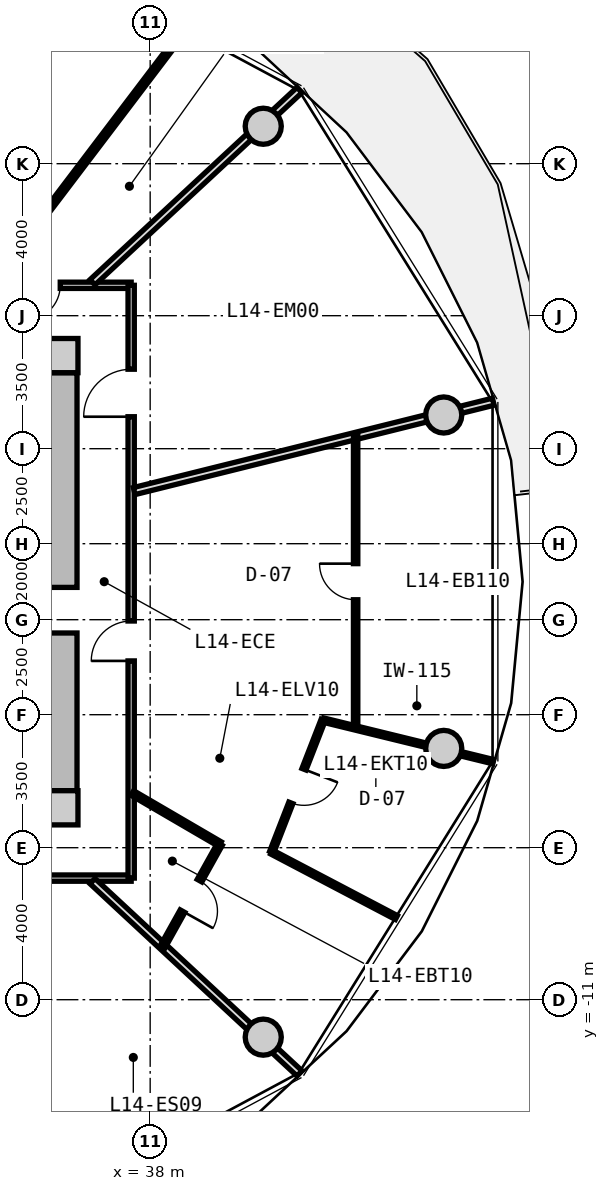
"""IFC4 building model, lengths in metres.
Left out: names, types, materials, properties, quantities, classifications, styles, units other than length and angle.
Written with IfcOpenShell. Run it as: python <this file> out.ifc"""

import sys

from ifc_helpers import new_model, si_unit, direction, frame, frame_2d, origin, origin_2d, place, context, subcontext, project, spatial, rectangle, circle, extrude, source, transform, mapped, element, fill, save


model = new_model("IFC4")
c1 = context("Model", 3, precision=1e-05, world=origin(), true_north=direction((0.0, 1.0)))
c2 = subcontext(c1, "Body", "Model", "MODEL_VIEW")
j1 = project(units=[si_unit("LENGTHUNIT", "METRE"), si_unit("PLANEANGLEUNIT", "RADIAN")], contexts=[c1])
p1 = place(None, origin())
s1 = spatial("IfcSite", under=j1, at=p1, CompositionType="ELEMENT")
p2 = place(p1, origin())
s2 = spatial("IfcBuilding", under=s1, at=p2, CompositionType="ELEMENT")
p3 = place(p2, frame((0.0, 0.0, 49.05)))
s3 = spatial("IfcBuildingStorey", under=s2, at=p3, CompositionType="ELEMENT", Elevation=49.05)
m1 = source(origin(), c2, "Body", "SweptSolid", [
    extrude(rectangle(XDim=0.9, YDim=0.9, at=origin_2d()), origin(), (0.0, 0.0, 1.0), 3.05),
])
for number, where, z_axis, x_axis in (
    (1, (35.65, -5.95, 0.0), (0.0, 0.0, 1.0), (1.0, 0.0, 0.0)),
    (2, (35.65, 5.95, 0.0), (0.0, 0.0, 1.0), (1.0, 0.0, 0.0)),
):
    element("IfcColumn", number, at=place(p3, frame(where, z_axis=z_axis, x_axis=x_axis)), inside=s3, PredefinedType="COLUMN", context=c2, shape_type="MappedRepresentation", body=[
        mapped(m1, transform((0.0, 0.0, 0.0), x_axis=(1.0, 0.0, 0.0), y_axis=(0.0, 1.0, 0.0), z_axis=(0.0, 0.0, 1.0), scale=1.0)),
    ])
m2 = source(origin(), c2, "Body", "SweptSolid", [
    extrude(rectangle(XDim=11.0, YDim=0.85, at=frame_2d((5.5, 0.0))), origin(), (0.0, 0.0, 1.0), 2.79),
])
p4 = place(p3, frame((35.65, 5.5, 0.0), z_axis=(0.0, 0.0, 1.0), x_axis=(0.0, -1.0, 0.0)))
e3 = element("IfcWall", 3, at=p4, inside=s3, PredefinedType="SHEAR", context=c2, shape_type="MappedRepresentation", body=[
    mapped(m2, transform((0.0, 0.0, 0.0), x_axis=(1.0, 0.0, 0.0), y_axis=(0.0, 1.0, 0.0), z_axis=(0.0, 0.0, 1.0), scale=1.0)),
])
p5 = place(p4, frame((5.65, 0.0, 0.0)))
e4 = element("IfcOpeningElement", 4, at=p5, cuts=e3, PredefinedType="OPENING", context=c2, shape_type="SweptSolid", body=[
    extrude(rectangle(XDim=1.2, YDim=2.15, at=frame_2d((0.6, 1.075))), frame((0.0, 0.435, 0.0), z_axis=(0.0, -1.0, 0.0), x_axis=(1.0, 0.0, 0.0)), (0.0, 0.0, 1.0), 0.87),
])
m3 = source(origin(), c2, "Body", "SweptSolid", [
    extrude(circle(Radius=0.475, at=origin_2d()), origin(), (0.0, 0.0, 1.0), 3.05),
])
for number, where, z_axis, x_axis in (
    (5, (45.725, 4.387, 0.0), (0.0, 0.0, 1.0), (1.0, 0.0, 0.0)),
    (6, (40.975, 11.985, 0.0), (0.0, 0.0, 1.0), (1.0, 0.0, 0.0)),
    (7, (40.975, -11.985, 0.0), (0.0, 0.0, 1.0), (1.0, 0.0, 0.0)),
    (8, (45.725, -4.387, 0.0), (0.0, 0.0, 1.0), (1.0, 0.0, 0.0)),
):
    element("IfcColumn", number, at=place(p3, frame(where, z_axis=z_axis, x_axis=x_axis)), inside=s3, PredefinedType="COLUMN", context=c2, shape_type="MappedRepresentation", body=[
        mapped(m3, transform((0.0, 0.0, 0.0), x_axis=(1.0, 0.0, 0.0), y_axis=(0.0, 1.0, 0.0), z_axis=(0.0, 0.0, 1.0), scale=1.0)),
    ])
m4 = source(origin(), c2, "Body", "SweptSolid", [
    extrude(rectangle(XDim=19.0, YDim=0.165, at=frame_2d((9.5, 0.0))), origin(), (0.0, 0.0, 1.0), 2.775),
])
p6 = place(p3, frame((18.5, 7.8, 0.0), z_axis=(0.0, 0.0, 1.0), x_axis=(1.0, 0.0, 0.0)))
e9 = element("IfcWall", 9, at=p6, inside=s3, PredefinedType="PARTITIONING", context=c2, shape_type="MappedRepresentation", body=[
    mapped(m4, transform((0.0, 0.0, 0.0), x_axis=(1.0, 0.0, 0.0), y_axis=(0.0, 1.0, 0.0), z_axis=(0.0, 0.0, 1.0), scale=1.0)),
])
p7 = place(p6, frame((16.214, 0.0, 0.0)))
e10 = element("IfcOpeningElement", 10, at=p7, cuts=e9, PredefinedType="OPENING", context=c2, shape_type="SweptSolid", body=[
    extrude(rectangle(XDim=0.92, YDim=2.1, at=frame_2d((0.46, 1.05))), frame((0.0, 0.093, 0.0), z_axis=(0.0, -1.0, 0.0), x_axis=(1.0, 0.0, 0.0)), (0.0, 0.0, 1.0), 0.185),
])
p8 = place(p6, frame((13.063, 0.0, 0.0)))
e11 = element("IfcOpeningElement", 11, at=p8, cuts=e9, PredefinedType="OPENING", context=c2, shape_type="SweptSolid", body=[
    extrude(rectangle(XDim=0.92, YDim=2.1, at=frame_2d((0.46, 1.05))), frame((0.0, 0.093, 0.0), z_axis=(0.0, -1.0, 0.0), x_axis=(1.0, 0.0, 0.0)), (0.0, 0.0, 1.0), 0.185),
])
p9 = place(p6, frame((8.875, 0.0, 0.0)))
e12 = element("IfcOpeningElement", 12, at=p9, cuts=e9, PredefinedType="OPENING", context=c2, shape_type="SweptSolid", body=[
    extrude(rectangle(XDim=1.25, YDim=2.2, at=frame_2d((0.625, 1.1))), frame((0.0, 0.093, 0.0), z_axis=(0.0, -1.0, 0.0), x_axis=(1.0, 0.0, 0.0)), (0.0, 0.0, 1.0), 0.185),
])
p10 = place(p6, frame((3.506, 0.0, 0.0)))
e13 = element("IfcOpeningElement", 13, at=p10, cuts=e9, PredefinedType="OPENING", context=c2, shape_type="SweptSolid", body=[
    extrude(rectangle(XDim=1.25, YDim=2.2, at=frame_2d((0.625, 1.1))), frame((0.0, 0.093, 0.0), z_axis=(0.0, -1.0, 0.0), x_axis=(1.0, 0.0, 0.0)), (0.0, 0.0, 1.0), 0.185),
])
p11 = place(p3, frame((37.5, -7.8, 0.0), z_axis=(0.0, 0.0, 1.0), x_axis=(-1.0, 0.0, 0.0)))
e14 = element("IfcWall", 14, at=p11, inside=s3, PredefinedType="PARTITIONING", context=c2, shape_type="MappedRepresentation", body=[
    mapped(m4, transform((0.0, 0.0, 0.0), x_axis=(1.0, 0.0, 0.0), y_axis=(0.0, 1.0, 0.0), z_axis=(0.0, 0.0, 1.0), scale=1.0)),
])
p12 = place(p11, frame((12.706, 0.0, 0.0)))
e15 = element("IfcOpeningElement", 15, at=p12, cuts=e14, PredefinedType="OPENING", context=c2, shape_type="SweptSolid", body=[
    extrude(rectangle(XDim=1.05, YDim=2.15, at=frame_2d((0.525, 1.075))), frame((0.0, 0.093, 0.0), z_axis=(0.0, -1.0, 0.0), x_axis=(1.0, 0.0, 0.0)), (0.0, 0.0, 1.0), 0.185),
])
p13 = place(p11, frame((7.959, 0.0, 0.0)))
e16 = element("IfcOpeningElement", 16, at=p13, cuts=e14, PredefinedType="OPENING", context=c2, shape_type="SweptSolid", body=[
    extrude(rectangle(XDim=1.05, YDim=2.15, at=frame_2d((0.525, 1.075))), frame((0.0, 0.093, 0.0), z_axis=(0.0, -1.0, 0.0), x_axis=(1.0, 0.0, 0.0)), (0.0, 0.0, 1.0), 0.185),
])
p14 = place(p11, frame((2.451, 0.0, 0.0)))
e17 = element("IfcOpeningElement", 17, at=p14, cuts=e14, PredefinedType="OPENING", context=c2, shape_type="SweptSolid", body=[
    extrude(rectangle(XDim=1.05, YDim=2.15, at=frame_2d((0.525, 1.075))), frame((0.0, 0.093, 0.0), z_axis=(0.0, -1.0, 0.0), x_axis=(1.0, 0.0, 0.0)), (0.0, 0.0, 1.0), 0.185),
])
m5 = source(origin(), c2, "Body", "SweptSolid", [
    extrude(rectangle(XDim=15.6, YDim=0.165, at=frame_2d((7.8, 0.0))), origin(), (0.0, 0.0, 1.0), 2.775),
])
p15 = place(p3, frame((37.5, 7.8, 0.0), z_axis=(0.0, 0.0, 1.0), x_axis=(0.0, -1.0, 0.0)))
e18 = element("IfcWall", 18, at=p15, inside=s3, PredefinedType="PARTITIONING", context=c2, shape_type="MappedRepresentation", body=[
    mapped(m5, transform((0.0, 0.0, 0.0), x_axis=(1.0, 0.0, 0.0), y_axis=(0.0, 1.0, 0.0), z_axis=(0.0, 0.0, 1.0), scale=1.0)),
])
p16 = place(p15, frame((8.835, 0.0, 0.0)))
e19 = element("IfcOpeningElement", 19, at=p16, cuts=e18, PredefinedType="OPENING", context=c2, shape_type="SweptSolid", body=[
    extrude(rectangle(XDim=1.05, YDim=2.15, at=frame_2d((0.525, 1.075))), frame((0.0, 0.093, 0.0), z_axis=(0.0, -1.0, 0.0), x_axis=(1.0, 0.0, 0.0)), (0.0, 0.0, 1.0), 0.185),
])
p17 = place(p15, frame((2.208, 0.0, 0.0)))
e20 = element("IfcOpeningElement", 20, at=p17, cuts=e18, PredefinedType="OPENING", context=c2, shape_type="SweptSolid", body=[
    extrude(rectangle(XDim=1.25, YDim=2.2, at=frame_2d((0.625, 1.1))), frame((0.0, 0.093, 0.0), z_axis=(0.0, -1.0, 0.0), x_axis=(1.0, 0.0, 0.0)), (0.0, 0.0, 1.0), 0.185),
])
m6 = source(origin(), c2, "Body", "SweptSolid", [
    extrude(rectangle(XDim=7.435, YDim=0.19, at=frame_2d((3.717, 0.0))), origin(), (0.0, 0.0, 1.0), 2.225),
])
p18 = place(p3, frame((36.483, -7.88, 0.0), z_axis=(0.0, 0.0, 1.0), x_axis=(0.732651956848, -0.680603489652, 0.0)))
e21 = element("IfcWall", 21, at=p18, inside=s3, PredefinedType="PARTITIONING", context=c2, shape_type="MappedRepresentation", body=[
    mapped(m6, transform((0.0, 0.0, 0.0), x_axis=(1.0, 0.0, 0.0), y_axis=(0.0, 1.0, 0.0), z_axis=(0.0, 0.0, 1.0), scale=1.0)),
])
m7 = source(origin(), c2, "Body", "SweptSolid", [
    extrude(rectangle(XDim=9.737, YDim=0.19, at=frame_2d((4.869, 0.0))), origin(), (0.0, 0.0, 1.0), 2.225),
])
p19 = place(p3, frame((37.58, 2.385, 0.0), z_axis=(0.0, 0.0, 1.0), x_axis=(0.970392716238, 0.241532557375, 0.0)))
e22 = element("IfcWall", 22, at=p19, inside=s3, PredefinedType="PARTITIONING", context=c2, shape_type="MappedRepresentation", body=[
    mapped(m7, transform((0.0, 0.0, 0.0), x_axis=(1.0, 0.0, 0.0), y_axis=(0.0, 1.0, 0.0), z_axis=(0.0, 0.0, 1.0), scale=1.0)),
])
m8 = source(origin(), c2, "Body", "SweptSolid", [
    extrude(rectangle(XDim=7.709, YDim=0.115, at=frame_2d((3.855, 0.0))), origin(), (0.0, 0.0, 1.0), 2.775),
])
p20 = place(p3, frame((43.406, -3.855, 0.0), z_axis=(0.0, 0.0, 1.0), x_axis=(0.0, 1.0, 0.0)))
e23 = element("IfcWall", 23, at=p20, inside=s3, PredefinedType="PARTITIONING", context=c2, shape_type="MappedRepresentation", body=[
    mapped(m8, transform((0.0, 0.0, 0.0), x_axis=(1.0, 0.0, 0.0), y_axis=(0.0, 1.0, 0.0), z_axis=(0.0, 0.0, 1.0), scale=1.0)),
])
p21 = place(p20, frame((3.38, 0.0, 0.0)))
e24 = element("IfcOpeningElement", 24, at=p21, cuts=e23, PredefinedType="OPENING", context=c2, shape_type="SweptSolid", body=[
    extrude(rectangle(XDim=0.95, YDim=2.1, at=frame_2d((0.475, 1.05))), frame((0.0, 0.067, 0.0), z_axis=(0.0, -1.0, 0.0), x_axis=(1.0, 0.0, 0.0)), (0.0, 0.0, 1.0), 0.135),
])
m9 = source(origin(), c2, "Body", "SweptSolid", [
    extrude(rectangle(XDim=4.608, YDim=0.115, at=frame_2d((2.304, 0.0))), origin(), (0.0, 0.0, 1.0), 2.225),
])
p22 = place(p3, frame((42.553, -3.641, 0.0), z_axis=(0.0, 0.0, 1.0), x_axis=(0.97135200068, -0.237645304552, 0.0)))
e25 = element("IfcWall", 25, at=p22, inside=s3, PredefinedType="PARTITIONING", context=c2, shape_type="MappedRepresentation", body=[
    mapped(m9, transform((0.0, 0.0, 0.0), x_axis=(1.0, 0.0, 0.0), y_axis=(0.0, 1.0, 0.0), z_axis=(0.0, 0.0, 1.0), scale=1.0)),
])
m10 = source(origin(), c2, "Body", "SweptSolid", [
    extrude(rectangle(XDim=2.669, YDim=0.14, at=frame_2d((1.335, 0.0))), origin(), (0.0, 0.0, 1.0), 2.775),
])
p23 = place(p3, frame((37.53, -5.561, 0.0), z_axis=(0.0, 0.0, 1.0), x_axis=(0.86369928178, -0.50400749067, 0.0)))
e26 = element("IfcWall", 26, at=p23, inside=s3, PredefinedType="PARTITIONING", context=c2, shape_type="MappedRepresentation", body=[
    mapped(m10, transform((0.0, 0.0, 0.0), x_axis=(1.0, 0.0, 0.0), y_axis=(0.0, 1.0, 0.0), z_axis=(0.0, 0.0, 1.0), scale=1.0)),
])
m11 = source(origin(), c2, "Body", "SweptSolid", [
    extrude(rectangle(XDim=3.121, YDim=0.14, at=frame_2d((1.561, 0.0))), origin(), (0.0, 0.0, 1.0), 2.775),
])
p24 = place(p3, frame((39.836, -6.906, 0.0), z_axis=(0.0, 0.0, 1.0), x_axis=(-0.487302357327, -0.873233309342, 0.0)))
e27 = element("IfcWall", 27, at=p24, inside=s3, PredefinedType="PARTITIONING", context=c2, shape_type="MappedRepresentation", body=[
    mapped(m11, transform((0.0, 0.0, 0.0), x_axis=(1.0, 0.0, 0.0), y_axis=(0.0, 1.0, 0.0), z_axis=(0.0, 0.0, 1.0), scale=1.0)),
])
p25 = place(p24, frame((1.101, 0.0, 0.0)))
e28 = element("IfcOpeningElement", 28, at=p25, cuts=e27, PredefinedType="OPENING", context=c2, shape_type="SweptSolid", body=[
    extrude(rectangle(XDim=0.92, YDim=2.1, at=frame_2d((0.46, 1.05))), frame((0.0, 0.08, 0.0), z_axis=(0.0, -1.0, 0.0), x_axis=(1.0, 0.0, 0.0)), (0.0, 0.0, 1.0), 0.16),
])
m12 = source(origin(), c2, "Body", "SweptSolid", [
    extrude(rectangle(XDim=3.706, YDim=0.115, at=frame_2d((1.853, 0.0))), origin(), (0.0, 0.0, 1.0), 2.775),
])
p26 = place(p3, frame((41.198, -7.115, 0.0), z_axis=(0.0, 0.0, 1.0), x_axis=(0.88538502503, -0.464858427322, 0.0)))
e29 = element("IfcWall", 29, at=p26, inside=s3, PredefinedType="PARTITIONING", context=c2, shape_type="MappedRepresentation", body=[
    mapped(m12, transform((0.0, 0.0, 0.0), x_axis=(1.0, 0.0, 0.0), y_axis=(0.0, 1.0, 0.0), z_axis=(0.0, 0.0, 1.0), scale=1.0)),
])
m13 = source(origin(), c2, "Body", "SweptSolid", [
    extrude(rectangle(XDim=3.729, YDim=0.115, at=frame_2d((1.864, 0.0))), origin(), (0.0, 0.0, 1.0), 2.775),
])
p27 = place(p3, frame((41.198, -7.115, 0.0), z_axis=(0.0, 0.0, 1.0), x_axis=(0.363055991464, 0.93176732453, 0.0)))
e30 = element("IfcWall", 30, at=p27, inside=s3, PredefinedType="PARTITIONING", context=c2, shape_type="MappedRepresentation", body=[
    mapped(m13, transform((0.0, 0.0, 0.0), x_axis=(1.0, 0.0, 0.0), y_axis=(0.0, 1.0, 0.0), z_axis=(0.0, 0.0, 1.0), scale=1.0)),
])
p28 = place(p27, frame((1.389, 0.0, 0.0)))
e31 = element("IfcOpeningElement", 31, at=p28, cuts=e30, PredefinedType="OPENING", context=c2, shape_type="SweptSolid", body=[
    extrude(rectangle(XDim=0.95, YDim=2.1, at=frame_2d((0.475, 1.05))), frame((0.0, 0.067, 0.0), z_axis=(0.0, -1.0, 0.0), x_axis=(1.0, 0.0, 0.0)), (0.0, 0.0, 1.0), 0.135),
])
p29 = place(p3, frame((36.483, 7.88, 0.0), z_axis=(0.0, 0.0, 1.0), x_axis=(0.732651956848, 0.680603489652, 0.0)))
e32 = element("IfcWall", 32, at=p29, inside=s3, PredefinedType="PARTITIONING", context=c2, shape_type="MappedRepresentation", body=[
    mapped(m6, transform((0.0, 0.0, 0.0), x_axis=(1.0, 0.0, 0.0), y_axis=(0.0, 1.0, 0.0), z_axis=(0.0, 0.0, 1.0), scale=1.0)),
])
m14 = source(origin(), c2, "Body", "SweptSolid", [
    extrude(rectangle(XDim=8.436, YDim=0.14, at=frame_2d((4.218, 0.0))), origin(), (0.0, 0.0, 1.0), 2.775),
])
p30 = place(p3, frame((33.828, 7.83, 0.0), z_axis=(0.0, 0.0, 1.0), x_axis=(0.604486552388, 0.796615345058, 0.0)))
e33 = element("IfcWall", 33, at=p30, inside=s3, PredefinedType="PARTITIONING", context=c2, shape_type="MappedRepresentation", body=[
    mapped(m14, transform((0.0, 0.0, 0.0), x_axis=(1.0, 0.0, 0.0), y_axis=(0.0, 1.0, 0.0), z_axis=(0.0, 0.0, 1.0), scale=1.0)),
])
m15 = source(origin(), c2, "Body", "SweptSolid", [
    extrude(rectangle(XDim=1.2, YDim=2.15, at=frame_2d((0.6, 1.075))), frame((0.0, 0.025, 0.0), z_axis=(0.0, -1.0, 0.0), x_axis=(1.0, 0.0, 0.0)), (0.0, 0.0, 1.0), 0.05),
])
p31 = place(p5, frame((1.2, 0.0, 0.0), z_axis=(0.0, 0.0, 1.0), x_axis=(-1.0, 0.0, 0.0)))
e34 = element("IfcDoor", 34, at=p31, inside=s3, OperationType="SINGLE_SWING_RIGHT", PredefinedType="DOOR", context=c2, shape_type="MappedRepresentation", body=[
    mapped(m15, transform((0.0, 0.0, 0.0), x_axis=(1.0, 0.0, 0.0), y_axis=(0.0, 1.0, 0.0), z_axis=(0.0, 0.0, 1.0), scale=1.0)),
])
fill(e4, e34)
m16 = source(origin(), c2, "Body", "SweptSolid", [
    extrude(rectangle(XDim=1.05, YDim=2.15, at=frame_2d((0.525, 1.075))), frame((0.0, 0.025, 0.0), z_axis=(0.0, -1.0, 0.0), x_axis=(1.0, 0.0, 0.0)), (0.0, 0.0, 1.0), 0.05),
])
p32 = place(p16, frame((1.05, 0.0, 0.0), z_axis=(0.0, 0.0, 1.0), x_axis=(-1.0, 0.0, 0.0)))
e35 = element("IfcDoor", 35, at=p32, inside=s3, OperationType="SINGLE_SWING_LEFT", PredefinedType="DOOR", context=c2, shape_type="MappedRepresentation", body=[
    mapped(m16, transform((0.0, 0.0, 0.0), x_axis=(1.0, 0.0, 0.0), y_axis=(0.0, 1.0, 0.0), z_axis=(0.0, 0.0, 1.0), scale=1.0)),
])
fill(e19, e35)
m17 = source(origin(), c2, "Body", "SweptSolid", [
    extrude(rectangle(XDim=0.92, YDim=2.1, at=frame_2d((0.46, 1.05))), frame((0.0, 0.025, 0.0), z_axis=(0.0, -1.0, 0.0), x_axis=(1.0, 0.0, 0.0)), (0.0, 0.0, 1.0), 0.05),
])
p33 = place(p25, origin())
e36 = element("IfcDoor", 36, at=p33, inside=s3, OperationType="SINGLE_SWING_RIGHT", PredefinedType="DOOR", context=c2, shape_type="MappedRepresentation", body=[
    mapped(m17, transform((0.0, 0.0, 0.0), x_axis=(1.0, 0.0, 0.0), y_axis=(0.0, 1.0, 0.0), z_axis=(0.0, 0.0, 1.0), scale=1.0)),
])
fill(e28, e36)
m18 = source(origin(), c2, "Body", "SweptSolid", [
    extrude(rectangle(XDim=0.95, YDim=2.1, at=frame_2d((0.475, 1.05))), frame((0.0, 0.025, 0.0), z_axis=(0.0, -1.0, 0.0), x_axis=(1.0, 0.0, 0.0)), (0.0, 0.0, 1.0), 0.05),
])
p34 = place(p28, frame((0.95, 0.0, 0.0), z_axis=(0.0, 0.0, 1.0), x_axis=(-1.0, 0.0, 0.0)))
e37 = element("IfcDoor", 37, at=p34, inside=s3, OperationType="SINGLE_SWING_LEFT", PredefinedType="DOOR", context=c2, shape_type="MappedRepresentation", body=[
    mapped(m18, transform((0.0, 0.0, 0.0), x_axis=(1.0, 0.0, 0.0), y_axis=(0.0, 1.0, 0.0), z_axis=(0.0, 0.0, 1.0), scale=1.0)),
])
fill(e31, e37)
p35 = place(p21, origin())
e38 = element("IfcDoor", 38, at=p35, inside=s3, OperationType="SINGLE_SWING_RIGHT", PredefinedType="DOOR", context=c2, shape_type="MappedRepresentation", body=[
    mapped(m18, transform((0.0, 0.0, 0.0), x_axis=(1.0, 0.0, 0.0), y_axis=(0.0, 1.0, 0.0), z_axis=(0.0, 0.0, 1.0), scale=1.0)),
])
fill(e24, e38)
m19 = source(origin(), c2, "Body", "SweptSolid", [
    extrude(rectangle(XDim=1.25, YDim=2.2, at=frame_2d((0.625, 1.1))), frame((0.0, 0.025, 0.0), z_axis=(0.0, -1.0, 0.0), x_axis=(1.0, 0.0, 0.0)), (0.0, 0.0, 1.0), 0.05),
])
p36 = place(p17, frame((1.25, 0.0, 0.0), z_axis=(0.0, 0.0, 1.0), x_axis=(-1.0, 0.0, 0.0)))
e39 = element("IfcDoor", 39, at=p36, inside=s3, OperationType="SINGLE_SWING_LEFT", PredefinedType="DOOR", context=c2, shape_type="MappedRepresentation", body=[
    mapped(m19, transform((0.0, 0.0, 0.0), x_axis=(1.0, 0.0, 0.0), y_axis=(0.0, 1.0, 0.0), z_axis=(0.0, 0.0, 1.0), scale=1.0)),
])
fill(e20, e39)
p37 = place(p7, frame((0.92, 0.0, 0.0), z_axis=(0.0, 0.0, 1.0), x_axis=(-1.0, 0.0, 0.0)))
e40 = element("IfcDoor", 40, at=p37, inside=s3, OperationType="SINGLE_SWING_RIGHT", PredefinedType="DOOR", context=c2, shape_type="MappedRepresentation", body=[
    mapped(m17, transform((0.0, 0.0, 0.0), x_axis=(1.0, 0.0, 0.0), y_axis=(0.0, 1.0, 0.0), z_axis=(0.0, 0.0, 1.0), scale=1.0)),
])
fill(e10, e40)
save(model, sys.argv[1])
